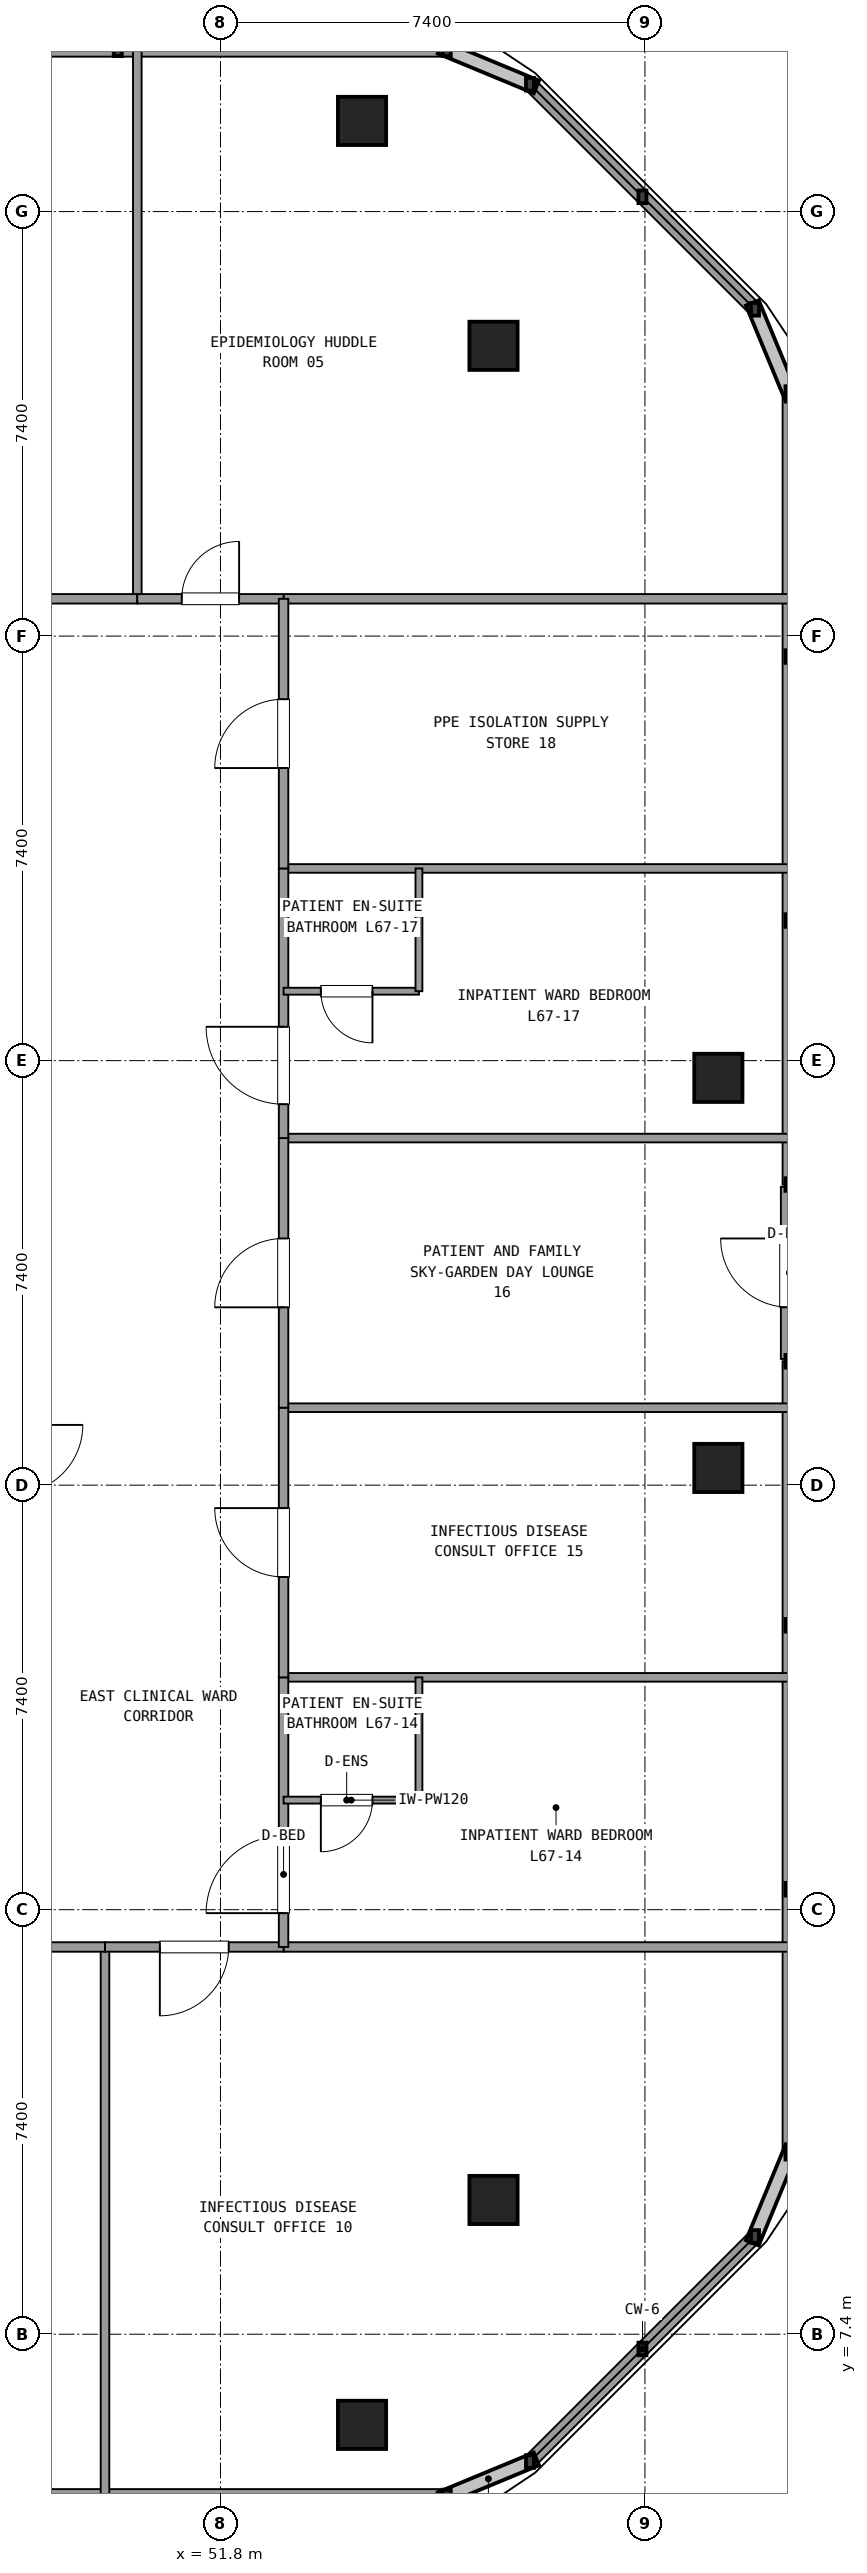
"""IFC4 building model, lengths in metres.
Left out: names, types, materials, properties, quantities, classifications, styles, units other than length and angle.
Written with IfcOpenShell. Run it as: python <this file> out.ifc"""

import sys

from ifc_helpers import new_model, si_unit, direction, frame, frame_2d, origin, origin_2d, place, context, subcontext, project, spatial, rectangle, extrude, element, fill, save


model = new_model("IFC4")
c1 = context("Model", 3, precision=1e-05, world=origin(), true_north=direction((0.0, 1.0)))
c2 = subcontext(c1, "Body", "Model", "MODEL_VIEW")
j1 = project(units=[si_unit("LENGTHUNIT", "METRE"), si_unit("PLANEANGLEUNIT", "RADIAN")], contexts=[c1])
p1 = place(None, origin())
s1 = spatial("IfcSite", under=j1, at=p1, CompositionType="ELEMENT")
p2 = place(p1, origin())
s2 = spatial("IfcBuilding", under=s1, at=p2, CompositionType="ELEMENT")
p3 = place(p2, frame((0.0, 0.0, 260.82)))
s3 = spatial("IfcBuildingStorey", under=s2, at=p3, CompositionType="ELEMENT", Elevation=260.82)
for number, where, z_axis, x_axis in (
    (1, (54.268, 5.82, 0.0), (0.0, 0.0, 1.0), (1.0, 0.0, 0.0)),
    (2, (56.56, 9.74, 0.0), (0.0, 0.0, 1.0), (1.0, 0.0, 0.0)),
    (3, (60.48, 22.5, 0.0), (0.0, 0.0, 1.0), (1.0, 0.0, 0.0)),
    (4, (60.48, 29.3, 0.0), (0.0, 0.0, 1.0), (1.0, 0.0, 0.0)),
    (5, (56.56, 42.06, 0.0), (0.0, 0.0, 1.0), (1.0, 0.0, 0.0)),
    (6, (54.268, 45.98, 0.0), (0.0, 0.0, 1.0), (1.0, 0.0, 0.0)),
):
    element("IfcColumn", number, at=place(p3, frame(where, z_axis=z_axis, x_axis=x_axis)), inside=s3, PredefinedType="COLUMN", context=c2, shape_type="SweptSolid", body=[
        extrude(rectangle(XDim=0.84, YDim=0.84, at=origin_2d()), origin(), (0.0, 0.0, 1.0), 3.6),
    ])
p4 = place(p3, frame((18.255, 4.58, 0.0), z_axis=(0.0, 0.0, 1.0), x_axis=(1.0, 0.0, 0.0)))
e7 = element("IfcWall", 7, at=p4, inside=s3, PredefinedType="SOLIDWALL", context=c2, shape_type="SweptSolid", body=[
    extrude(rectangle(XDim=37.49, YDim=0.24, at=frame_2d((18.745, 0.0))), origin(), (0.0, 0.0, 1.0), 0.85),
])
p5 = place(p3, frame((57.196, 5.181, 0.0), z_axis=(0.0, 0.0, 1.0), x_axis=(0.707084777957, 0.707128783731, 0.0)))
e8 = element("IfcWall", 8, at=p5, inside=s3, PredefinedType="SOLIDWALL", context=c2, shape_type="SweptSolid", body=[
    extrude(rectangle(XDim=5.548, YDim=0.24, at=frame_2d((2.774, 0.0))), origin(), (0.0, 0.0, 1.0), 0.85),
])
p6 = place(p3, frame((61.72, 24.4, 0.0), z_axis=(0.0, 0.0, 1.0), x_axis=(0.0, 1.0, 0.0)))
e9 = element("IfcWall", 9, at=p6, inside=s3, PredefinedType="SOLIDWALL", context=c2, shape_type="SweptSolid", body=[
    extrude(rectangle(XDim=3.0, YDim=0.3, at=frame_2d((1.5, 0.0))), origin(), (0.0, 0.0, 1.0), 2.69),
])
p7 = place(p6, frame((0.9, 0.0, 0.0)))
e10 = element("IfcOpeningElement", 10, at=p7, cuts=e9, PredefinedType="OPENING", context=c2, shape_type="SweptSolid", body=[
    extrude(rectangle(XDim=1.2, YDim=2.2, at=frame_2d((0.6, 1.1))), frame((0.0, 0.16, 0.0), z_axis=(0.0, -1.0, 0.0), x_axis=(1.0, 0.0, 0.0)), (0.0, 0.0, 1.0), 0.32),
])
for number, where, z_axis, x_axis in (
    (11, (61.72, 10.555, 0.0), (0.0, 0.0, 1.0), (0.0, 1.0, 0.0)),
    (12, (61.72, 27.44, 0.0), (0.0, 0.0, 1.0), (0.0, 1.0, 0.0)),
):
    element("IfcWall", number, at=place(p3, frame(where, z_axis=z_axis, x_axis=x_axis)), inside=s3, PredefinedType="SOLIDWALL", context=c2, shape_type="SweptSolid", body=[
        extrude(rectangle(XDim=13.805, YDim=0.24, at=frame_2d((6.903, 0.0))), origin(), (0.0, 0.0, 1.0), 0.85),
    ])
p8 = place(p3, frame((61.119, 42.696, 0.0), z_axis=(0.0, 0.0, 1.0), x_axis=(-0.707106781187, 0.707106781187, 0.0)))
e13 = element("IfcWall", 13, at=p8, inside=s3, PredefinedType="SOLIDWALL", context=c2, shape_type="SweptSolid", body=[
    extrude(rectangle(XDim=5.548, YDim=0.24, at=frame_2d((2.774, 0.0))), origin(), (0.0, 0.0, 1.0), 0.85),
])
p9 = place(p3, frame((55.745, 47.22, 0.0), z_axis=(0.0, 0.0, 1.0), x_axis=(-1.0, 0.0, 0.0)))
e14 = element("IfcWall", 14, at=p9, inside=s3, PredefinedType="SOLIDWALL", context=c2, shape_type="SweptSolid", body=[
    extrude(rectangle(XDim=17.204, YDim=0.24, at=frame_2d((8.602, 0.0))), origin(), (0.0, 0.0, 1.0), 0.85),
])
for number, where, z_axis, x_axis in (
    (15, (52.9, 37.65, 0.0), (0.0, 0.0, 1.0), (1.0, 0.0, 0.0)),
    (16, (52.9, 14.15, 0.0), (0.0, 0.0, 1.0), (1.0, 0.0, 0.0)),
):
    element("IfcWall", number, at=place(p3, frame(where, z_axis=z_axis, x_axis=x_axis)), inside=s3, PredefinedType="PARTITIONING", context=c2, shape_type="SweptSolid", body=[
        extrude(rectangle(XDim=8.8, YDim=0.165, at=frame_2d((4.4, 0.0))), origin(), (0.0, 0.0, 1.0), 2.61),
    ])
p10 = place(p3, frame((50.35, 37.65, 0.0), z_axis=(0.0, 0.0, 1.0), x_axis=(0.0, 1.0, 0.0)))
e17 = element("IfcWall", 17, at=p10, inside=s3, PredefinedType="PARTITIONING", context=c2, shape_type="SweptSolid", body=[
    extrude(rectangle(XDim=9.55, YDim=0.15, at=frame_2d((4.775, 0.0))), origin(), (0.0, 0.0, 1.0), 2.61),
])
p11 = place(p3, frame((41.584, 37.65, 0.0), z_axis=(0.0, 0.0, 1.0), x_axis=(1.0, 0.0, 0.0)))
e18 = element("IfcWall", 18, at=p11, inside=s3, PredefinedType="PARTITIONING", context=c2, shape_type="SweptSolid", body=[
    extrude(rectangle(XDim=8.766, YDim=0.165, at=frame_2d((4.383, 0.0))), origin(), (0.0, 0.0, 1.0), 2.61),
])
p12 = place(p11, frame((3.783, 0.0, 0.0)))
e19 = element("IfcOpeningElement", 19, at=p12, cuts=e18, PredefinedType="OPENING", context=c2, shape_type="SweptSolid", body=[
    extrude(rectangle(XDim=1.2, YDim=2.15, at=frame_2d((0.6, 1.075))), frame((0.0, 0.093, 0.0), z_axis=(0.0, -1.0, 0.0), x_axis=(1.0, 0.0, 0.0)), (0.0, 0.0, 1.0), 0.185),
])
p13 = place(p3, frame((50.35, 37.65, 0.0), z_axis=(0.0, 0.0, 1.0), x_axis=(1.0, 0.0, 0.0)))
e20 = element("IfcWall", 20, at=p13, inside=s3, PredefinedType="PARTITIONING", context=c2, shape_type="SweptSolid", body=[
    extrude(rectangle(XDim=2.55, YDim=0.165, at=frame_2d((1.275, 0.0))), origin(), (0.0, 0.0, 1.0), 2.61),
])
p14 = place(p13, frame((0.775, 0.0, 0.0)))
e21 = element("IfcOpeningElement", 21, at=p14, cuts=e20, PredefinedType="OPENING", context=c2, shape_type="SweptSolid", body=[
    extrude(rectangle(XDim=1.0, YDim=2.15, at=frame_2d((0.5, 1.075))), frame((0.0, 0.093, 0.0), z_axis=(0.0, -1.0, 0.0), x_axis=(1.0, 0.0, 0.0)), (0.0, 0.0, 1.0), 0.185),
])
p15 = place(p3, frame((49.787, 14.15, 0.0), z_axis=(0.0, 0.0, 1.0), x_axis=(0.0, -1.0, 0.0)))
e22 = element("IfcWall", 22, at=p15, inside=s3, PredefinedType="PARTITIONING", context=c2, shape_type="SweptSolid", body=[
    extrude(rectangle(XDim=9.55, YDim=0.15, at=frame_2d((4.775, 0.0))), origin(), (0.0, 0.0, 1.0), 2.61),
])
p16 = place(p3, frame((40.315, 14.15, 0.0), z_axis=(0.0, 0.0, 1.0), x_axis=(1.0, 0.0, 0.0)))
e23 = element("IfcWall", 23, at=p16, inside=s3, PredefinedType="PARTITIONING", context=c2, shape_type="SweptSolid", body=[
    extrude(rectangle(XDim=9.472, YDim=0.165, at=frame_2d((4.736, 0.0))), origin(), (0.0, 0.0, 1.0), 2.61),
])
p17 = place(p16, frame((4.136, 0.0, 0.0)))
e24 = element("IfcOpeningElement", 24, at=p17, cuts=e23, PredefinedType="OPENING", context=c2, shape_type="SweptSolid", body=[
    extrude(rectangle(XDim=1.2, YDim=2.15, at=frame_2d((0.6, 1.075))), frame((0.0, 0.093, 0.0), z_axis=(0.0, -1.0, 0.0), x_axis=(1.0, 0.0, 0.0)), (0.0, 0.0, 1.0), 0.185),
])
p18 = place(p3, frame((49.787, 14.15, 0.0), z_axis=(0.0, 0.0, 1.0), x_axis=(1.0, 0.0, 0.0)))
e25 = element("IfcWall", 25, at=p18, inside=s3, PredefinedType="PARTITIONING", context=c2, shape_type="SweptSolid", body=[
    extrude(rectangle(XDim=3.113, YDim=0.165, at=frame_2d((1.556, 0.0))), origin(), (0.0, 0.0, 1.0), 2.61),
])
p19 = place(p18, frame((0.956, 0.0, 0.0)))
e26 = element("IfcOpeningElement", 26, at=p19, cuts=e25, PredefinedType="OPENING", context=c2, shape_type="SweptSolid", body=[
    extrude(rectangle(XDim=1.2, YDim=2.15, at=frame_2d((0.6, 1.075))), frame((0.0, 0.093, 0.0), z_axis=(0.0, -1.0, 0.0), x_axis=(1.0, 0.0, 0.0)), (0.0, 0.0, 1.0), 0.185),
])
p20 = place(p3, frame((52.9, 18.85, 0.0), z_axis=(0.0, 0.0, 1.0), x_axis=(1.0, 0.0, 0.0)))
e27 = element("IfcWall", 27, at=p20, inside=s3, PredefinedType="PARTITIONING", context=c2, shape_type="SweptSolid", body=[
    extrude(rectangle(XDim=8.8, YDim=0.15, at=frame_2d((4.4, 0.0))), origin(), (0.0, 0.0, 1.0), 2.61),
])
p21 = place(p3, frame((52.9, 14.15, 0.0), z_axis=(0.0, 0.0, 1.0), x_axis=(0.0, 1.0, 0.0)))
e28 = element("IfcWall", 28, at=p21, inside=s3, PredefinedType="PARTITIONING", context=c2, shape_type="SweptSolid", body=[
    extrude(rectangle(XDim=4.7, YDim=0.165, at=frame_2d((2.35, 0.0))), origin(), (0.0, 0.0, 1.0), 2.61),
])
p22 = place(p21, frame((0.59, 0.0, 0.0)))
e29 = element("IfcOpeningElement", 29, at=p22, cuts=e28, PredefinedType="OPENING", context=c2, shape_type="SweptSolid", body=[
    extrude(rectangle(XDim=1.35, YDim=2.15, at=frame_2d((0.675, 1.075))), frame((0.0, 0.093, 0.0), z_axis=(0.0, -1.0, 0.0), x_axis=(1.0, 0.0, 0.0)), (0.0, 0.0, 1.0), 0.185),
])
p23 = place(p3, frame((52.9, 16.71, 0.0), z_axis=(0.0, 0.0, 1.0), x_axis=(1.0, 0.0, 0.0)))
e30 = element("IfcWall", 30, at=p23, inside=s3, PredefinedType="PLUMBINGWALL", context=c2, shape_type="SweptSolid", body=[
    extrude(rectangle(XDim=2.36, YDim=0.12, at=frame_2d((1.18, 0.0))), origin(), (0.0, 0.0, 1.0), 2.61),
])
p24 = place(p23, frame((0.65, 0.0, 0.0)))
e31 = element("IfcOpeningElement", 31, at=p24, cuts=e30, PredefinedType="OPENING", context=c2, shape_type="SweptSolid", body=[
    extrude(rectangle(XDim=0.9, YDim=2.1, at=frame_2d((0.45, 1.05))), frame((0.0, 0.07, 0.0), z_axis=(0.0, -1.0, 0.0), x_axis=(1.0, 0.0, 0.0)), (0.0, 0.0, 1.0), 0.14),
])
p25 = place(p3, frame((55.26, 16.71, 0.0), z_axis=(0.0, 0.0, 1.0), x_axis=(0.0, 1.0, 0.0)))
e32 = element("IfcWall", 32, at=p25, inside=s3, PredefinedType="PLUMBINGWALL", context=c2, shape_type="SweptSolid", body=[
    extrude(rectangle(XDim=2.14, YDim=0.12, at=frame_2d((1.07, 0.0))), origin(), (0.0, 0.0, 1.0), 2.61),
])
p26 = place(p3, frame((52.9, 23.55, 0.0), z_axis=(0.0, 0.0, 1.0), x_axis=(1.0, 0.0, 0.0)))
e33 = element("IfcWall", 33, at=p26, inside=s3, PredefinedType="PARTITIONING", context=c2, shape_type="SweptSolid", body=[
    extrude(rectangle(XDim=8.8, YDim=0.15, at=frame_2d((4.4, 0.0))), origin(), (0.0, 0.0, 1.0), 2.61),
])
p27 = place(p3, frame((52.9, 18.85, 0.0), z_axis=(0.0, 0.0, 1.0), x_axis=(0.0, 1.0, 0.0)))
e34 = element("IfcWall", 34, at=p27, inside=s3, PredefinedType="PARTITIONING", context=c2, shape_type="SweptSolid", body=[
    extrude(rectangle(XDim=4.7, YDim=0.165, at=frame_2d((2.35, 0.0))), origin(), (0.0, 0.0, 1.0), 2.61),
])
p28 = place(p27, frame((1.75, 0.0, 0.0)))
e35 = element("IfcOpeningElement", 35, at=p28, cuts=e34, PredefinedType="OPENING", context=c2, shape_type="SweptSolid", body=[
    extrude(rectangle(XDim=1.2, YDim=2.15, at=frame_2d((0.6, 1.075))), frame((0.0, 0.093, 0.0), z_axis=(0.0, -1.0, 0.0), x_axis=(1.0, 0.0, 0.0)), (0.0, 0.0, 1.0), 0.185),
])
p29 = place(p3, frame((52.9, 28.25, 0.0), z_axis=(0.0, 0.0, 1.0), x_axis=(1.0, 0.0, 0.0)))
e36 = element("IfcWall", 36, at=p29, inside=s3, PredefinedType="PARTITIONING", context=c2, shape_type="SweptSolid", body=[
    extrude(rectangle(XDim=8.8, YDim=0.15, at=frame_2d((4.4, 0.0))), origin(), (0.0, 0.0, 1.0), 2.61),
])
p30 = place(p3, frame((52.9, 23.55, 0.0), z_axis=(0.0, 0.0, 1.0), x_axis=(0.0, 1.0, 0.0)))
e37 = element("IfcWall", 37, at=p30, inside=s3, PredefinedType="PARTITIONING", context=c2, shape_type="SweptSolid", body=[
    extrude(rectangle(XDim=4.7, YDim=0.165, at=frame_2d((2.35, 0.0))), origin(), (0.0, 0.0, 1.0), 2.61),
])
p31 = place(p30, frame((1.75, 0.0, 0.0)))
e38 = element("IfcOpeningElement", 38, at=p31, cuts=e37, PredefinedType="OPENING", context=c2, shape_type="SweptSolid", body=[
    extrude(rectangle(XDim=1.2, YDim=2.15, at=frame_2d((0.6, 1.075))), frame((0.0, 0.093, 0.0), z_axis=(0.0, -1.0, 0.0), x_axis=(1.0, 0.0, 0.0)), (0.0, 0.0, 1.0), 0.185),
])
p32 = place(p3, frame((52.9, 32.95, 0.0), z_axis=(0.0, 0.0, 1.0), x_axis=(1.0, 0.0, 0.0)))
e39 = element("IfcWall", 39, at=p32, inside=s3, PredefinedType="PARTITIONING", context=c2, shape_type="SweptSolid", body=[
    extrude(rectangle(XDim=8.8, YDim=0.15, at=frame_2d((4.4, 0.0))), origin(), (0.0, 0.0, 1.0), 2.61),
])
p33 = place(p3, frame((52.9, 28.25, 0.0), z_axis=(0.0, 0.0, 1.0), x_axis=(0.0, 1.0, 0.0)))
e40 = element("IfcWall", 40, at=p33, inside=s3, PredefinedType="PARTITIONING", context=c2, shape_type="SweptSolid", body=[
    extrude(rectangle(XDim=4.7, YDim=0.165, at=frame_2d((2.35, 0.0))), origin(), (0.0, 0.0, 1.0), 2.61),
])
p34 = place(p33, frame((0.59, 0.0, 0.0)))
e41 = element("IfcOpeningElement", 41, at=p34, cuts=e40, PredefinedType="OPENING", context=c2, shape_type="SweptSolid", body=[
    extrude(rectangle(XDim=1.35, YDim=2.15, at=frame_2d((0.675, 1.075))), frame((0.0, 0.093, 0.0), z_axis=(0.0, -1.0, 0.0), x_axis=(1.0, 0.0, 0.0)), (0.0, 0.0, 1.0), 0.185),
])
p35 = place(p3, frame((52.9, 30.81, 0.0), z_axis=(0.0, 0.0, 1.0), x_axis=(1.0, 0.0, 0.0)))
e42 = element("IfcWall", 42, at=p35, inside=s3, PredefinedType="PLUMBINGWALL", context=c2, shape_type="SweptSolid", body=[
    extrude(rectangle(XDim=2.36, YDim=0.12, at=frame_2d((1.18, 0.0))), origin(), (0.0, 0.0, 1.0), 2.61),
])
p36 = place(p35, frame((0.65, 0.0, 0.0)))
e43 = element("IfcOpeningElement", 43, at=p36, cuts=e42, PredefinedType="OPENING", context=c2, shape_type="SweptSolid", body=[
    extrude(rectangle(XDim=0.9, YDim=2.1, at=frame_2d((0.45, 1.05))), frame((0.0, 0.07, 0.0), z_axis=(0.0, -1.0, 0.0), x_axis=(1.0, 0.0, 0.0)), (0.0, 0.0, 1.0), 0.14),
])
p37 = place(p3, frame((55.26, 30.81, 0.0), z_axis=(0.0, 0.0, 1.0), x_axis=(0.0, 1.0, 0.0)))
e44 = element("IfcWall", 44, at=p37, inside=s3, PredefinedType="PLUMBINGWALL", context=c2, shape_type="SweptSolid", body=[
    extrude(rectangle(XDim=2.14, YDim=0.12, at=frame_2d((1.07, 0.0))), origin(), (0.0, 0.0, 1.0), 2.61),
])
p38 = place(p3, frame((52.9, 32.95, 0.0), z_axis=(0.0, 0.0, 1.0), x_axis=(0.0, 1.0, 0.0)))
e45 = element("IfcWall", 45, at=p38, inside=s3, PredefinedType="PARTITIONING", context=c2, shape_type="SweptSolid", body=[
    extrude(rectangle(XDim=4.7, YDim=0.165, at=frame_2d((2.35, 0.0))), origin(), (0.0, 0.0, 1.0), 2.61),
])
p39 = place(p38, frame((1.75, 0.0, 0.0)))
e46 = element("IfcOpeningElement", 46, at=p39, cuts=e45, PredefinedType="OPENING", context=c2, shape_type="SweptSolid", body=[
    extrude(rectangle(XDim=1.2, YDim=2.15, at=frame_2d((0.6, 1.075))), frame((0.0, 0.093, 0.0), z_axis=(0.0, -1.0, 0.0), x_axis=(1.0, 0.0, 0.0)), (0.0, 0.0, 1.0), 0.185),
])
p40 = place(p14, origin())
e47 = element("IfcDoor", 47, at=p40, inside=s3, OperationType="SINGLE_SWING_RIGHT", PredefinedType="DOOR", context=c2, shape_type="SweptSolid", body=[
    extrude(rectangle(XDim=1.0, YDim=2.15, at=frame_2d((0.5, 1.075))), frame((0.0, 0.025, 0.0), z_axis=(0.0, -1.0, 0.0), x_axis=(1.0, 0.0, 0.0)), (0.0, 0.0, 1.0), 0.05),
])
fill(e21, e47)
p41 = place(p19, frame((1.2, 0.0, 0.0), z_axis=(0.0, 0.0, 1.0), x_axis=(-1.0, 0.0, 0.0)))
e48 = element("IfcDoor", 48, at=p41, inside=s3, OperationType="SINGLE_SWING_LEFT", PredefinedType="DOOR", context=c2, shape_type="SweptSolid", body=[
    extrude(rectangle(XDim=1.2, YDim=2.15, at=frame_2d((0.6, 1.075))), frame((0.0, 0.025, 0.0), z_axis=(0.0, -1.0, 0.0), x_axis=(1.0, 0.0, 0.0)), (0.0, 0.0, 1.0), 0.05),
])
fill(e26, e48)
p42 = place(p24, frame((0.9, 0.0, 0.0), z_axis=(0.0, 0.0, 1.0), x_axis=(-1.0, 0.0, 0.0)))
e49 = element("IfcDoor", 49, at=p42, inside=s3, OperationType="SINGLE_SWING_LEFT", PredefinedType="DOOR", context=c2, shape_type="SweptSolid", body=[
    extrude(rectangle(XDim=0.9, YDim=2.1, at=frame_2d((0.45, 1.05))), frame((0.0, 0.025, 0.0), z_axis=(0.0, -1.0, 0.0), x_axis=(1.0, 0.0, 0.0)), (0.0, 0.0, 1.0), 0.05),
])
fill(e31, e49)
p43 = place(p22, origin())
e50 = element("IfcDoor", 50, at=p43, inside=s3, OperationType="SINGLE_SWING_LEFT", PredefinedType="DOOR", context=c2, shape_type="SweptSolid", body=[
    extrude(rectangle(XDim=1.35, YDim=2.15, at=frame_2d((0.675, 1.075))), frame((0.0, 0.025, 0.0), z_axis=(0.0, -1.0, 0.0), x_axis=(1.0, 0.0, 0.0)), (0.0, 0.0, 1.0), 0.05),
])
fill(e29, e50)
p44 = place(p28, origin())
e51 = element("IfcDoor", 51, at=p44, inside=s3, OperationType="SINGLE_SWING_RIGHT", PredefinedType="DOOR", context=c2, shape_type="SweptSolid", body=[
    extrude(rectangle(XDim=1.2, YDim=2.15, at=frame_2d((0.6, 1.075))), frame((0.0, 0.025, 0.0), z_axis=(0.0, -1.0, 0.0), x_axis=(1.0, 0.0, 0.0)), (0.0, 0.0, 1.0), 0.05),
])
fill(e35, e51)
p45 = place(p31, origin())
e52 = element("IfcDoor", 52, at=p45, inside=s3, OperationType="SINGLE_SWING_LEFT", PredefinedType="DOOR", context=c2, shape_type="SweptSolid", body=[
    extrude(rectangle(XDim=1.2, YDim=2.15, at=frame_2d((0.6, 1.075))), frame((0.0, 0.025, 0.0), z_axis=(0.0, -1.0, 0.0), x_axis=(1.0, 0.0, 0.0)), (0.0, 0.0, 1.0), 0.05),
])
fill(e38, e52)
p46 = place(p36, frame((0.9, 0.0, 0.0), z_axis=(0.0, 0.0, 1.0), x_axis=(-1.0, 0.0, 0.0)))
e53 = element("IfcDoor", 53, at=p46, inside=s3, OperationType="SINGLE_SWING_RIGHT", PredefinedType="DOOR", context=c2, shape_type="SweptSolid", body=[
    extrude(rectangle(XDim=0.9, YDim=2.1, at=frame_2d((0.45, 1.05))), frame((0.0, 0.025, 0.0), z_axis=(0.0, -1.0, 0.0), x_axis=(1.0, 0.0, 0.0)), (0.0, 0.0, 1.0), 0.05),
])
fill(e43, e53)
p47 = place(p34, origin())
e54 = element("IfcDoor", 54, at=p47, inside=s3, OperationType="SINGLE_SWING_RIGHT", PredefinedType="DOOR", context=c2, shape_type="SweptSolid", body=[
    extrude(rectangle(XDim=1.35, YDim=2.15, at=frame_2d((0.675, 1.075))), frame((0.0, 0.025, 0.0), z_axis=(0.0, -1.0, 0.0), x_axis=(1.0, 0.0, 0.0)), (0.0, 0.0, 1.0), 0.05),
])
fill(e41, e54)
p48 = place(p39, origin())
e55 = element("IfcDoor", 55, at=p48, inside=s3, OperationType="SINGLE_SWING_LEFT", PredefinedType="DOOR", context=c2, shape_type="SweptSolid", body=[
    extrude(rectangle(XDim=1.2, YDim=2.15, at=frame_2d((0.6, 1.075))), frame((0.0, 0.025, 0.0), z_axis=(0.0, -1.0, 0.0), x_axis=(1.0, 0.0, 0.0)), (0.0, 0.0, 1.0), 0.05),
])
fill(e46, e55)
save(model, sys.argv[1])
